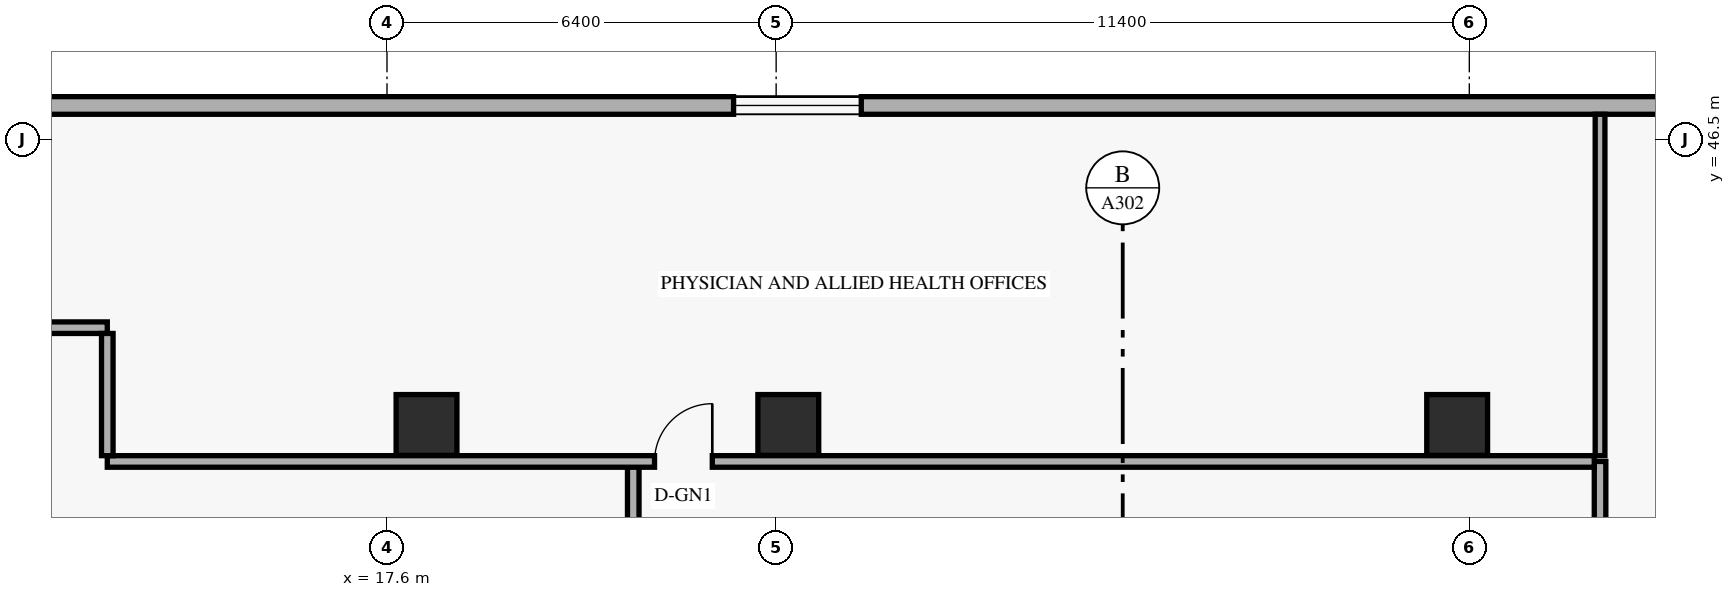
"""IFC4 building model, lengths in metres.
Left out: names, types, materials, properties, quantities, classifications, styles, units other than length and angle.
Written with IfcOpenShell. Run it as: python <this file> out.ifc"""

import sys

from ifc_helpers import new_model, si_unit, direction, frame, frame_2d, origin, origin_2d, place, context, subcontext, project, spatial, rectangle, extrude, element, fill, save


model = new_model("IFC4")
c1 = context("Model", 3, precision=1e-05, world=origin(), true_north=direction((0.0, 1.0)))
c2 = subcontext(c1, "Body", "Model", "MODEL_VIEW")
j1 = project(units=[si_unit("LENGTHUNIT", "METRE"), si_unit("PLANEANGLEUNIT", "RADIAN")], contexts=[c1])
p1 = place(None, origin())
s1 = spatial("IfcSite", under=j1, at=p1, CompositionType="ELEMENT")
p2 = place(p1, origin())
s2 = spatial("IfcBuilding", under=s1, at=p2, CompositionType="ELEMENT")
p3 = place(p2, frame((0.0, 0.0, 9.6)))
s3 = spatial("IfcBuildingStorey", under=s2, at=p3, CompositionType="ELEMENT", Elevation=9.6)
for number, where, z_axis, x_axis in (
    (1, (18.25, 41.8, 0.0), (0.0, 0.0, 1.0), (1.0, 0.0, 0.0)),
    (2, (24.2, 41.8, 0.0), (0.0, 0.0, 1.0), (1.0, 0.0, 0.0)),
    (3, (35.2, 41.8, 0.0), (0.0, 0.0, 1.0), (1.0, 0.0, 0.0)),
):
    element("IfcColumn", number, at=place(p3, frame(where, z_axis=z_axis, x_axis=x_axis)), inside=s3, PredefinedType="COLUMN", context=c2, shape_type="SweptSolid", body=[
        extrude(rectangle(XDim=1.0, YDim=1.0, at=origin_2d()), origin(), (0.0, 0.0, 1.0), 4.8),
    ])
p4 = place(p3, frame((49.38, 47.055, 0.0), z_axis=(0.0, 0.0, 1.0), x_axis=(-1.0, 0.0, 0.0)))
e4 = element("IfcWall", 4, at=p4, inside=s3, PredefinedType="SOLIDWALL", context=c2, shape_type="SweptSolid", body=[
    extrude(rectangle(XDim=44.36, YDim=0.29, at=frame_2d((22.18, 0.0))), origin(), (0.0, 0.0, 1.0), 4.52),
])
p5 = place(p4, frame((40.245, 0.0, 0.85)))
e5 = element("IfcOpeningElement", 5, at=p5, cuts=e4, PredefinedType="OPENING", context=c2, shape_type="SweptSolid", body=[
    extrude(rectangle(XDim=2.1, YDim=1.75, at=frame_2d((1.05, 0.875))), frame((0.0, 0.155, 0.0), z_axis=(0.0, -1.0, 0.0), x_axis=(1.0, 0.0, 0.0)), (0.0, 0.0, 1.0), 0.31),
])
p6 = place(p4, frame((23.98, 0.0, 0.85)))
e6 = element("IfcOpeningElement", 6, at=p6, cuts=e4, PredefinedType="OPENING", context=c2, shape_type="SweptSolid", body=[
    extrude(rectangle(XDim=2.1, YDim=1.75, at=frame_2d((1.05, 0.875))), frame((0.0, 0.155, 0.0), z_axis=(0.0, -1.0, 0.0), x_axis=(1.0, 0.0, 0.0)), (0.0, 0.0, 1.0), 0.31),
])
p7 = place(p4, frame((4.865, 0.0, 0.85)))
e7 = element("IfcOpeningElement", 7, at=p7, cuts=e4, PredefinedType="OPENING", context=c2, shape_type="SweptSolid", body=[
    extrude(rectangle(XDim=2.1, YDim=1.75, at=frame_2d((1.05, 0.875))), frame((0.0, 0.155, 0.0), z_axis=(0.0, -1.0, 0.0), x_axis=(1.0, 0.0, 0.0)), (0.0, 0.0, 1.0), 0.31),
])
p8 = place(p3, frame((21.65, 6.8, 0.0), z_axis=(0.0, 0.0, 1.0), x_axis=(0.0, 1.0, 0.0)))
e8 = element("IfcWall", 8, at=p8, inside=s3, PredefinedType="STANDARD", context=c2, shape_type="SweptSolid", body=[
    extrude(rectangle(XDim=34.4, YDim=0.19, at=frame_2d((17.2, 0.0))), origin(), (0.0, 0.0, 1.0), 3.575),
])
p9 = place(p8, frame((20.96, 0.0, 0.0)))
e9 = element("IfcOpeningElement", 9, at=p9, cuts=e8, PredefinedType="OPENING", context=c2, shape_type="SweptSolid", body=[
    extrude(rectangle(XDim=0.92, YDim=2.14, at=frame_2d((0.46, 1.07))), frame((0.0, 0.105, 0.0), z_axis=(0.0, -1.0, 0.0), x_axis=(1.0, 0.0, 0.0)), (0.0, 0.0, 1.0), 0.21),
])
p10 = place(p8, frame((28.2, 0.0, 0.0)))
e10 = element("IfcOpeningElement", 10, at=p10, cuts=e8, PredefinedType="OPENING", context=c2, shape_type="SweptSolid", body=[
    extrude(rectangle(XDim=0.95, YDim=2.15, at=frame_2d((0.475, 1.075))), frame((0.0, 0.105, 0.0), z_axis=(0.0, -1.0, 0.0), x_axis=(1.0, 0.0, 0.0)), (0.0, 0.0, 1.0), 0.21),
])
p11 = place(p8, frame((6.0, 0.0, 0.0)))
e11 = element("IfcOpeningElement", 11, at=p11, cuts=e8, PredefinedType="OPENING", context=c2, shape_type="SweptSolid", body=[
    extrude(rectangle(XDim=0.9, YDim=2.1, at=frame_2d((0.45, 1.05))), frame((0.0, 0.105, 0.0), z_axis=(0.0, -1.0, 0.0), x_axis=(1.0, 0.0, 0.0)), (0.0, 0.0, 1.0), 0.21),
])
p12 = place(p3, frame((37.55, 6.8, 0.0), z_axis=(0.0, 0.0, 1.0), x_axis=(0.0, 1.0, 0.0)))
e12 = element("IfcWall", 12, at=p12, inside=s3, PredefinedType="STANDARD", context=c2, shape_type="SweptSolid", body=[
    extrude(rectangle(XDim=34.4, YDim=0.19, at=frame_2d((17.2, 0.0))), origin(), (0.0, 0.0, 1.0), 3.575),
])
p13 = place(p12, frame((3.0, 0.0, 0.0)))
e13 = element("IfcOpeningElement", 13, at=p13, cuts=e12, PredefinedType="OPENING", context=c2, shape_type="SweptSolid", body=[
    extrude(rectangle(XDim=1.05, YDim=2.15, at=frame_2d((0.525, 1.075))), frame((0.0, 0.105, 0.0), z_axis=(0.0, -1.0, 0.0), x_axis=(1.0, 0.0, 0.0)), (0.0, 0.0, 1.0), 0.21),
])
p14 = place(p12, frame((16.673, 0.0, 0.0)))
e14 = element("IfcOpeningElement", 14, at=p14, cuts=e12, PredefinedType="OPENING", context=c2, shape_type="SweptSolid", body=[
    extrude(rectangle(XDim=1.2, YDim=2.15, at=frame_2d((0.6, 1.075))), frame((0.0, 0.105, 0.0), z_axis=(0.0, -1.0, 0.0), x_axis=(1.0, 0.0, 0.0)), (0.0, 0.0, 1.0), 0.21),
])
p15 = place(p12, frame((28.13, 0.0, 0.0)))
e15 = element("IfcOpeningElement", 15, at=p15, cuts=e12, PredefinedType="OPENING", context=c2, shape_type="SweptSolid", body=[
    extrude(rectangle(XDim=1.05, YDim=2.15, at=frame_2d((0.525, 1.075))), frame((0.0, 0.105, 0.0), z_axis=(0.0, -1.0, 0.0), x_axis=(1.0, 0.0, 0.0)), (0.0, 0.0, 1.0), 0.21),
])
p16 = place(p3, frame((13.0, 41.2, 0.0), z_axis=(0.0, 0.0, 1.0), x_axis=(1.0, 0.0, 0.0)))
e16 = element("IfcWall", 16, at=p16, inside=s3, PredefinedType="STANDARD", context=c2, shape_type="SweptSolid", body=[
    extrude(rectangle(XDim=24.455, YDim=0.19, at=frame_2d((12.228, 0.0))), origin(), (0.0, 0.0, 1.0), 3.732),
])
p17 = place(p16, frame((9.0, 0.0, 0.0)))
e17 = element("IfcOpeningElement", 17, at=p17, cuts=e16, PredefinedType="OPENING", context=c2, shape_type="SweptSolid", body=[
    extrude(rectangle(XDim=0.95, YDim=2.15, at=frame_2d((0.475, 1.075))), frame((0.0, 0.105, 0.0), z_axis=(0.0, -1.0, 0.0), x_axis=(1.0, 0.0, 0.0)), (0.0, 0.0, 1.0), 0.21),
])
p18 = place(p3, frame((11.15, 43.4, 0.0), z_axis=(0.0, 0.0, 1.0), x_axis=(1.0, 0.0, 0.0)))
e18 = element("IfcWall", 18, at=p18, inside=s3, PredefinedType="STANDARD", context=c2, shape_type="SweptSolid", body=[
    extrude(rectangle(XDim=1.85, YDim=0.19, at=frame_2d((0.925, 0.0))), origin(), (0.0, 0.0, 1.0), 4.52),
])
p19 = place(p3, frame((13.0, 41.295, 0.0), z_axis=(0.0, 0.0, 1.0), x_axis=(0.0, 1.0, 0.0)))
e19 = element("IfcWall", 19, at=p19, inside=s3, PredefinedType="STANDARD", context=c2, shape_type="SweptSolid", body=[
    extrude(rectangle(XDim=2.01, YDim=0.19, at=frame_2d((1.005, 0.0))), origin(), (0.0, 0.0, 1.0), 3.969),
])
p20 = place(p3, frame((37.55, 41.295, 0.0), z_axis=(0.0, 0.0, 1.0), x_axis=(0.0, 1.0, 0.0)))
e20 = element("IfcWall", 20, at=p20, inside=s3, PredefinedType="PARTITIONING", context=c2, shape_type="SweptSolid", body=[
    extrude(rectangle(XDim=5.615, YDim=0.16, at=frame_2d((2.808, 0.0))), origin(), (0.0, 0.0, 1.0), 3.969),
])
p21 = place(p6, origin())
e21 = element("IfcWindow", 21, at=p21, inside=s3, PartitioningType="SINGLE_PANEL", PredefinedType="WINDOW", context=c2, shape_type="SweptSolid", body=[
    extrude(rectangle(XDim=2.1, YDim=1.75, at=frame_2d((1.05, 0.875))), frame((0.0, 0.03, 0.0), z_axis=(0.0, -1.0, 0.0), x_axis=(1.0, 0.0, 0.0)), (0.0, 0.0, 1.0), 0.06),
])
fill(e6, e21)
p22 = place(p17, origin())
e22 = element("IfcDoor", 22, at=p22, inside=s3, OperationType="SINGLE_SWING_RIGHT", PredefinedType="DOOR", context=c2, shape_type="SweptSolid", body=[
    extrude(rectangle(XDim=0.95, YDim=2.15, at=frame_2d((0.475, 1.075))), frame((0.0, 0.025, 0.0), z_axis=(0.0, -1.0, 0.0), x_axis=(1.0, 0.0, 0.0)), (0.0, 0.0, 1.0), 0.05),
])
fill(e17, e22)
save(model, sys.argv[1])
